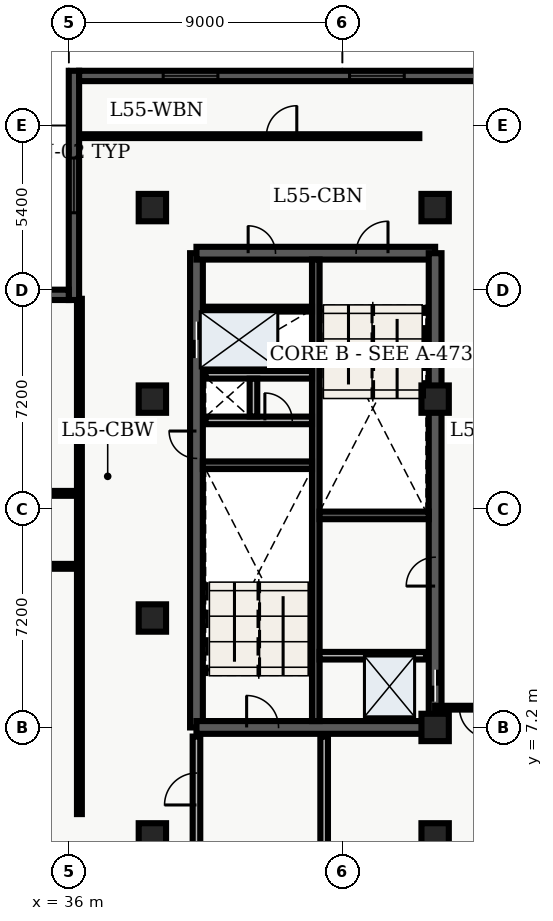
"""IFC4 building model, lengths in metres.
Left out: names, types, materials, properties, quantities, classifications, styles, units other than length and angle.
Written with IfcOpenShell. Run it as: python <this file> out.ifc"""

import sys

from ifc_helpers import new_model, entity, si_unit, converted_unit, direction, frame, origin_with_axes, origin_2d_with_axis, place, context, subcontext, project, spatial, polyline, rectangle, outline, extrude, element, fill, save


model = new_model("IFC4")
c1 = context("Model", 3, precision=1e-05, world=origin_with_axes(), true_north=direction((0.0, 1.0)))
c2 = subcontext(c1, "Body", "Model", "MODEL_VIEW")
j1 = project(units=[si_unit("LENGTHUNIT", "METRE"), converted_unit("PLANEANGLEUNIT", "DEGREE", entity("IfcPlaneAngleMeasure", 0.017), si_unit("PLANEANGLEUNIT", "RADIAN"), dimensions=[0, 0, 0, 0, 0, 0, 0])], contexts=[c1])
p1 = place(None, origin_with_axes())
s1 = spatial("IfcSite", under=j1, at=p1, CompositionType="ELEMENT")
p2 = place(p1, origin_with_axes())
s2 = spatial("IfcBuilding", under=s1, at=p2, CompositionType="ELEMENT")
p3 = place(p2, frame((0.0, 0.0, 224.7), z_axis=(0.0, 0.0, 1.0), x_axis=(1.0, 0.0, 0.0)))
s3 = spatial("IfcBuildingStorey", under=s2, at=p3, CompositionType="ELEMENT", Elevation=224.7)
p4 = place(p3, frame((40.2, 7.2, 0.0), z_axis=(0.0, 0.0, 1.0), x_axis=(0.0, 1.0, 0.0)))
e1 = element("IfcWall", 1, at=p4, inside=s3, PredefinedType="SHEAR", context=c2, shape_type="SweptSolid", body=[
    extrude(outline(polyline([(0.0, -0.21), (15.6, -0.21), (15.6, 0.21), (0.0, 0.21), (0.0, -0.21)])), origin_with_axes(), (0.0, 0.0, 1.0), 3.66),
])
p5 = place(p4, frame((12.75, 0.0, 0.0), z_axis=(0.0, 0.0, 1.0), x_axis=(1.0, 0.0, 0.0)))
e2 = element("IfcOpeningElement", 2, at=p5, cuts=e1, PredefinedType="OPENING", context=c2, shape_type="SweptSolid", body=[
    extrude(rectangle(XDim=1.2, YDim=0.44, at=origin_2d_with_axis()), origin_with_axes(), (0.0, 0.0, 1.0), 2.15),
])
p6 = place(p4, frame((9.3, 0.0, 0.0), z_axis=(0.0, 0.0, 1.0), x_axis=(1.0, 0.0, 0.0)))
e3 = element("IfcOpeningElement", 3, at=p6, cuts=e1, PredefinedType="OPENING", context=c2, shape_type="SweptSolid", body=[
    extrude(rectangle(XDim=0.9, YDim=0.44, at=origin_2d_with_axis()), origin_with_axes(), (0.0, 0.0, 1.0), 2.15),
])
p7 = place(p3, frame((40.2, 7.2, 0.0), z_axis=(0.0, 0.0, 1.0), x_axis=(1.0, 0.0, 0.0)))
e4 = element("IfcWall", 4, at=p7, inside=s3, PredefinedType="SHEAR", context=c2, shape_type="SweptSolid", body=[
    extrude(outline(polyline([(0.0, -0.21), (7.85, -0.21), (7.85, 0.21), (0.0, 0.21), (0.0, -0.21)])), origin_with_axes(), (0.0, 0.0, 1.0), 3.66),
])
p8 = place(p7, frame((2.175, 0.0, 0.0), z_axis=(0.0, 0.0, 1.0), x_axis=(1.0, 0.0, 0.0)))
e5 = element("IfcOpeningElement", 5, at=p8, cuts=e4, PredefinedType="OPENING", context=c2, shape_type="SweptSolid", body=[
    extrude(rectangle(XDim=1.05, YDim=0.44, at=origin_2d_with_axis()), origin_with_axes(), (0.0, 0.0, 1.0), 2.15),
])
p9 = place(p3, frame((40.2, 22.8, 0.0), z_axis=(0.0, 0.0, 1.0), x_axis=(1.0, 0.0, 0.0)))
e6 = element("IfcWall", 6, at=p9, inside=s3, PredefinedType="SHEAR", context=c2, shape_type="SweptSolid", body=[
    extrude(outline(polyline([(0.0, -0.21), (7.85, -0.21), (7.85, 0.21), (0.0, 0.21), (0.0, -0.21)])), origin_with_axes(), (0.0, 0.0, 1.0), 3.66),
])
p10 = place(p9, frame((5.775, 0.0, 0.0), z_axis=(0.0, 0.0, 1.0), x_axis=(1.0, 0.0, 0.0)))
e7 = element("IfcOpeningElement", 7, at=p10, cuts=e6, PredefinedType="OPENING", context=c2, shape_type="SweptSolid", body=[
    extrude(rectangle(XDim=1.05, YDim=0.44, at=origin_2d_with_axis()), origin_with_axes(), (0.0, 0.0, 1.0), 2.15),
])
p11 = place(p9, frame((2.15, 0.0, 0.0), z_axis=(0.0, 0.0, 1.0), x_axis=(1.0, 0.0, 0.0)))
e8 = element("IfcOpeningElement", 8, at=p11, cuts=e6, PredefinedType="OPENING", context=c2, shape_type="SweptSolid", body=[
    extrude(rectangle(XDim=0.9, YDim=0.44, at=origin_2d_with_axis()), origin_with_axes(), (0.0, 0.0, 1.0), 2.15),
])
p12 = place(p3, frame((48.05, 7.2, 0.0), z_axis=(0.0, 0.0, 1.0), x_axis=(0.0, 1.0, 0.0)))
e9 = element("IfcWall", 9, at=p12, inside=s3, PredefinedType="SHEAR", context=c2, shape_type="SweptSolid", body=[
    extrude(outline(polyline([(0.0, -0.21), (15.6, -0.21), (15.6, 0.21), (0.0, 0.21), (0.0, -0.21)])), origin_with_axes(), (0.0, 0.0, 1.0), 3.66),
])
p13 = place(p12, frame((1.375, 0.0, 0.0), z_axis=(0.0, 0.0, 1.0), x_axis=(1.0, 0.0, 0.0)))
e10 = element("IfcOpeningElement", 10, at=p13, cuts=e9, PredefinedType="OPENING", context=c2, shape_type="SweptSolid", body=[
    extrude(rectangle(XDim=1.05, YDim=0.44, at=origin_2d_with_axis()), origin_with_axes(), (0.0, 0.0, 1.0), 2.15),
])
p14 = place(p12, frame((5.125, 0.0, 0.0), z_axis=(0.0, 0.0, 1.0), x_axis=(1.0, 0.0, 0.0)))
e11 = element("IfcOpeningElement", 11, at=p14, cuts=e9, PredefinedType="OPENING", context=c2, shape_type="SweptSolid", body=[
    extrude(rectangle(XDim=0.95, YDim=0.44, at=origin_2d_with_axis()), origin_with_axes(), (0.0, 0.0, 1.0), 2.15),
])
p15 = place(p3, frame((44.125, 7.41, 0.0), z_axis=(0.0, 0.0, 1.0), x_axis=(0.0, 1.0, 0.0)))
e12 = element("IfcWall", 12, at=p15, inside=s3, PredefinedType="SHEAR", context=c2, shape_type="SweptSolid", body=[
    extrude(outline(polyline([(0.0, -0.125), (15.18, -0.125), (15.18, 0.125), (0.0, 0.125), (0.0, -0.125)])), origin_with_axes(), (0.0, 0.0, 1.0), 3.66),
])
for number, where, z_axis, x_axis in (
    (13, (40.41, 15.825, 0.0), (0.0, 0.0, 1.0), (1.0, 0.0, 0.0)),
    (14, (44.25, 14.175, 0.0), (0.0, 0.0, 1.0), (1.0, 0.0, 0.0)),
):
    element("IfcWall", number, at=place(p3, frame(where, z_axis=z_axis, x_axis=x_axis)), inside=s3, PredefinedType="SHEAR", context=c2, shape_type="SweptSolid", body=[
        extrude(outline(polyline([(0.0, -0.125), (3.59, -0.125), (3.59, 0.125), (0.0, 0.125), (0.0, -0.125)])), origin_with_axes(), (0.0, 0.0, 1.0), 3.66),
    ])
p16 = place(p3, frame((40.5, 17.3, 0.0), z_axis=(0.0, 0.0, 1.0), x_axis=(1.0, 0.0, 0.0)))
e15 = element("IfcWall", 15, at=p16, inside=s3, PredefinedType="SOLIDWALL", context=c2, shape_type="SweptSolid", body=[
    extrude(outline(polyline([(0.0, -0.125), (3.5, -0.125), (3.5, 0.125), (0.0, 0.125), (0.0, -0.125)])), origin_with_axes(), (0.0, 0.0, 1.0), 2.7),
])
p17 = place(p16, frame((2.4, 0.0, 0.0), z_axis=(0.0, 0.0, 1.0), x_axis=(1.0, 0.0, 0.0)))
e16 = element("IfcOpeningElement", 16, at=p17, cuts=e15, PredefinedType="OPENING", context=c2, shape_type="SweptSolid", body=[
    extrude(rectangle(XDim=0.9, YDim=0.27, at=origin_2d_with_axis()), origin_with_axes(), (0.0, 0.0, 1.0), 2.15),
])
p18 = place(p3, frame((40.5, 18.8, 0.0), z_axis=(0.0, 0.0, 1.0), x_axis=(1.0, 0.0, 0.0)))
e17 = element("IfcWall", 17, at=p18, inside=s3, PredefinedType="SOLIDWALL", context=c2, shape_type="SweptSolid", body=[
    extrude(outline(polyline([(0.0, -0.125), (3.5, -0.125), (3.5, 0.125), (0.0, 0.125), (0.0, -0.125)])), origin_with_axes(), (0.0, 0.0, 1.0), 2.7),
])
p19 = place(p3, frame((42.075, 17.43, 0.0), z_axis=(0.0, 0.0, 1.0), x_axis=(0.0, 1.0, 0.0)))
e18 = element("IfcWall", 18, at=p19, inside=s3, PredefinedType="SOLIDWALL", context=c2, shape_type="SweptSolid", body=[
    extrude(outline(polyline([(0.0, -0.125), (1.24, -0.125), (1.24, 0.125), (0.0, 0.125), (0.0, -0.125)])), origin_with_axes(), (0.0, 0.0, 1.0), 2.7),
])
p20 = place(p3, frame((40.2, 3.1, 0.0), z_axis=(0.0, 0.0, 1.0), x_axis=(0.0, 1.0, 0.0)))
e19 = element("IfcWall", 19, at=p20, inside=s3, PredefinedType="SOLIDWALL", context=c2, shape_type="SweptSolid", body=[
    extrude(outline(polyline([(0.0, -0.125), (3.8, -0.125), (3.8, 0.125), (0.0, 0.125), (0.0, -0.125)])), origin_with_axes(), (0.0, 0.0, 1.0), 2.7),
])
p21 = place(p20, frame((2.075, 0.0, 0.0), z_axis=(0.0, 0.0, 1.0), x_axis=(1.0, 0.0, 0.0)))
e20 = element("IfcOpeningElement", 20, at=p21, cuts=e19, PredefinedType="OPENING", context=c2, shape_type="SweptSolid", body=[
    extrude(rectangle(XDim=1.05, YDim=0.27, at=origin_2d_with_axis()), origin_with_axes(), (0.0, 0.0, 1.0), 2.15),
])
p22 = place(p3, frame((44.4, 3.1, 0.0), z_axis=(0.0, 0.0, 1.0), x_axis=(0.0, 1.0, 0.0)))
e21 = element("IfcWall", 21, at=p22, inside=s3, PredefinedType="SOLIDWALL", context=c2, shape_type="SweptSolid", body=[
    extrude(outline(polyline([(0.0, -0.125), (3.8, -0.125), (3.8, 0.125), (0.0, 0.125), (0.0, -0.125)])), origin_with_axes(), (0.0, 0.0, 1.0), 2.7),
])
for number, where, z_axis, x_axis in (
    (22, (38.75, 3.6, 0.0), (0.0, 0.0, 1.0), (1.0, 0.0, 0.0)),
    (23, (38.75, 10.8, 0.0), (0.0, 0.0, 1.0), (1.0, 0.0, 0.0)),
    (24, (38.75, 18.0, 0.0), (0.0, 0.0, 1.0), (1.0, 0.0, 0.0)),
    (25, (38.75, 24.3, 0.0), (0.0, 0.0, 1.0), (1.0, 0.0, 0.0)),
    (26, (48.05, 3.6, 0.0), (0.0, 0.0, 1.0), (1.0, 0.0, 0.0)),
    (27, (48.05, 7.2, 0.0), (0.0, 0.0, 1.0), (1.0, 0.0, 0.0)),
    (28, (48.05, 18.0, 0.0), (0.0, 0.0, 1.0), (1.0, 0.0, 0.0)),
    (29, (48.05, 24.3, 0.0), (0.0, 0.0, 1.0), (1.0, 0.0, 0.0)),
):
    element("IfcColumn", number, at=place(p3, frame(where, z_axis=z_axis, x_axis=x_axis)), inside=s3, PredefinedType="COLUMN", context=c2, shape_type="SweptSolid", body=[
        extrude(rectangle(XDim=0.9, YDim=0.9, at=origin_2d_with_axis()), origin_with_axes(), (0.0, 0.0, 1.0), 3.9),
    ])
p23 = place(p3, frame((40.5, 20.96, 0.0), z_axis=(0.0, 0.0, 1.0), x_axis=(1.0, 0.0, 0.0)))
e30 = element("IfcWall", 30, at=p23, inside=s3, PredefinedType="PARTITIONING", context=c2, shape_type="SweptSolid", body=[
    extrude(outline(polyline([(0.0, -0.08), (3.5, -0.08), (3.5, 0.08), (0.0, 0.08), (0.0, -0.08)])), origin_with_axes(), (0.0, 0.0, 1.0), 2.7),
])
p24 = place(p3, frame((44.25, 9.56, 0.0), z_axis=(0.0, 0.0, 1.0), x_axis=(1.0, 0.0, 0.0)))
e31 = element("IfcWall", 31, at=p24, inside=s3, PredefinedType="SOLIDWALL", context=c2, shape_type="SweptSolid", body=[
    extrude(outline(polyline([(0.0, -0.125), (3.5, -0.125), (3.5, 0.125), (0.0, 0.125), (0.0, -0.125)])), origin_with_axes(), (0.0, 0.0, 1.0), 2.7),
])
p25 = place(p3, frame((20.3, 12.5, 0.0), z_axis=(0.0, 0.0, 1.0), x_axis=(1.0, 0.0, 0.0)))
e32 = element("IfcWall", 32, at=p25, inside=s3, PredefinedType="PARTITIONING", context=c2, shape_type="SweptSolid", body=[
    extrude(outline(polyline([(0.0, -0.08), (16.05, -0.08), (16.05, 0.08), (0.0, 0.08), (0.0, -0.08)])), origin_with_axes(), (0.0, 0.0, 1.0), 2.7),
])
p26 = place(p25, frame((3.677, 0.0, 0.0), z_axis=(0.0, 0.0, 1.0), x_axis=(1.0, 0.0, 0.0)))
e33 = element("IfcOpeningElement", 33, at=p26, cuts=e32, PredefinedType="OPENING", context=c2, shape_type="SweptSolid", body=[
    extrude(rectangle(XDim=1.0, YDim=0.18, at=origin_2d_with_axis()), origin_with_axes(), (0.0, 0.0, 1.0), 2.15),
])
p27 = place(p25, frame((11.572, 0.0, 0.0), z_axis=(0.0, 0.0, 1.0), x_axis=(1.0, 0.0, 0.0)))
e34 = element("IfcOpeningElement", 34, at=p27, cuts=e32, PredefinedType="OPENING", context=c2, shape_type="SweptSolid", body=[
    extrude(rectangle(XDim=1.0, YDim=0.18, at=origin_2d_with_axis()), origin_with_axes(), (0.0, 0.0, 1.0), 2.15),
])
p28 = place(p3, frame((20.3, 14.9, 0.0), z_axis=(0.0, 0.0, 1.0), x_axis=(1.0, 0.0, 0.0)))
e35 = element("IfcWall", 35, at=p28, inside=s3, PredefinedType="PARTITIONING", context=c2, shape_type="SweptSolid", body=[
    extrude(outline(polyline([(0.0, -0.08), (16.05, -0.08), (16.05, 0.08), (0.0, 0.08), (0.0, -0.08)])), origin_with_axes(), (0.0, 0.0, 1.0), 2.7),
])
p29 = place(p28, frame((3.877, 0.0, 0.0), z_axis=(0.0, 0.0, 1.0), x_axis=(1.0, 0.0, 0.0)))
e36 = element("IfcOpeningElement", 36, at=p29, cuts=e35, PredefinedType="OPENING", context=c2, shape_type="SweptSolid", body=[
    extrude(rectangle(XDim=1.0, YDim=0.18, at=origin_2d_with_axis()), origin_with_axes(), (0.0, 0.0, 1.0), 2.15),
])
p30 = place(p28, frame((9.511, 0.0, 0.0), z_axis=(0.0, 0.0, 1.0), x_axis=(1.0, 0.0, 0.0)))
e37 = element("IfcOpeningElement", 37, at=p30, cuts=e35, PredefinedType="OPENING", context=c2, shape_type="SweptSolid", body=[
    extrude(rectangle(XDim=1.0, YDim=0.18, at=origin_2d_with_axis()), origin_with_axes(), (0.0, 0.0, 1.0), 2.15),
])
p31 = place(p28, frame((13.709, 0.0, 0.0), z_axis=(0.0, 0.0, 1.0), x_axis=(1.0, 0.0, 0.0)))
e38 = element("IfcOpeningElement", 38, at=p31, cuts=e35, PredefinedType="OPENING", context=c2, shape_type="SweptSolid", body=[
    extrude(rectangle(XDim=1.0, YDim=0.18, at=origin_2d_with_axis()), origin_with_axes(), (0.0, 0.0, 1.0), 2.15),
])
p32 = place(p3, frame((36.35, 4.35, 0.0), z_axis=(0.0, 0.0, 1.0), x_axis=(0.0, 1.0, 0.0)))
e39 = element("IfcWall", 39, at=p32, inside=s3, PredefinedType="PARTITIONING", context=c2, shape_type="SweptSolid", body=[
    extrude(outline(polyline([(0.0, -0.08), (16.95, -0.08), (16.95, 0.08), (0.0, 0.08), (0.0, -0.08)])), origin_with_axes(), (0.0, 0.0, 1.0), 2.7),
])
p33 = place(p3, frame((51.865, 7.85, 0.0), z_axis=(0.0, 0.0, 1.0), x_axis=(-1.0, 0.0, 0.0)))
e40 = element("IfcWall", 40, at=p33, inside=s3, PredefinedType="PARTITIONING", context=c2, shape_type="SweptSolid", body=[
    extrude(outline(polyline([(0.0, -0.062), (3.815, -0.062), (3.815, 0.062), (0.0, 0.062), (0.0, -0.062)])), origin_with_axes(), (0.0, 0.0, 1.0), 2.7),
])
p34 = place(p33, frame((2.515, 0.0, 0.0), z_axis=(0.0, 0.0, 1.0), x_axis=(1.0, 0.0, 0.0)))
e41 = element("IfcOpeningElement", 41, at=p34, cuts=e40, PredefinedType="OPENING", context=c2, shape_type="SweptSolid", body=[
    extrude(rectangle(XDim=1.0, YDim=0.145, at=origin_2d_with_axis()), origin_with_axes(), (0.0, 0.0, 1.0), 2.15),
])
p35 = place(p3, frame((36.335, 26.65, 0.0), z_axis=(0.0, 0.0, 1.0), x_axis=(1.0, 0.0, 0.0)))
e42 = element("IfcWall", 42, at=p35, inside=s3, PredefinedType="PARTITIONING", context=c2, shape_type="SweptSolid", body=[
    extrude(outline(polyline([(0.0, -0.062), (11.195, -0.062), (11.195, 0.062), (0.0, 0.062), (0.0, -0.062)])), origin_with_axes(), (0.0, 0.0, 1.0), 2.7),
])
p36 = place(p35, frame((6.665, 0.0, 0.0), z_axis=(0.0, 0.0, 1.0), x_axis=(1.0, 0.0, 0.0)))
e43 = element("IfcOpeningElement", 43, at=p36, cuts=e42, PredefinedType="OPENING", context=c2, shape_type="SweptSolid", body=[
    extrude(rectangle(XDim=1.0, YDim=0.145, at=origin_2d_with_axis()), origin_with_axes(), (0.0, 0.0, 1.0), 2.15),
])
p37 = place(p3, frame((36.17, 21.26, 0.0), z_axis=(0.0, 0.0, 1.0), x_axis=(0.0, 1.0, 0.0)))
e44 = element("IfcWall", 44, at=p37, inside=s3, PredefinedType="SOLIDWALL", context=c2, shape_type="SweptSolid", body=[
    extrude(outline(polyline([(0.0, -0.17), (7.54, -0.17), (7.54, 0.17), (0.0, 0.17), (0.0, -0.17)])), origin_with_axes(), (0.0, 0.0, 1.0), 3.66),
])
p38 = place(p37, frame((3.77, 0.0, 0.45), z_axis=(0.0, 0.0, 1.0), x_axis=(1.0, 0.0, 0.0)))
e45 = element("IfcOpeningElement", 45, at=p38, cuts=e44, PredefinedType="OPENING", context=c2, shape_type="SweptSolid", body=[
    extrude(rectangle(XDim=1.8, YDim=0.36, at=origin_2d_with_axis()), origin_with_axes(), (0.0, 0.0, 1.0), 2.1),
])
p39 = place(p3, frame((36.34, 28.63, 0.0), z_axis=(0.0, 0.0, 1.0), x_axis=(1.0, 0.0, 0.0)))
e46 = element("IfcWall", 46, at=p39, inside=s3, PredefinedType="SOLIDWALL", context=c2, shape_type="SweptSolid", body=[
    extrude(outline(polyline([(0.0, -0.17), (13.46, -0.17), (13.46, 0.17), (0.0, 0.17), (0.0, -0.17)])), origin_with_axes(), (0.0, 0.0, 1.0), 3.66),
])
p40 = place(p39, frame((3.665, 0.0, 0.45), z_axis=(0.0, 0.0, 1.0), x_axis=(1.0, 0.0, 0.0)))
e47 = element("IfcOpeningElement", 47, at=p40, cuts=e46, PredefinedType="OPENING", context=c2, shape_type="SweptSolid", body=[
    extrude(rectangle(XDim=1.8, YDim=0.36, at=origin_2d_with_axis()), origin_with_axes(), (0.0, 0.0, 1.0), 2.1),
])
p41 = place(p39, frame((9.795, 0.0, 0.45), z_axis=(0.0, 0.0, 1.0), x_axis=(1.0, 0.0, 0.0)))
e48 = element("IfcOpeningElement", 48, at=p41, cuts=e46, PredefinedType="OPENING", context=c2, shape_type="SweptSolid", body=[
    extrude(rectangle(XDim=1.8, YDim=0.36, at=origin_2d_with_axis()), origin_with_axes(), (0.0, 0.0, 1.0), 2.1),
])
p42 = place(p3, frame((32.06, 21.43, 0.0), z_axis=(0.0, 0.0, 1.0), x_axis=(1.0, 0.0, 0.0)))
e49 = element("IfcWall", 49, at=p42, inside=s3, PredefinedType="SOLIDWALL", context=c2, shape_type="SweptSolid", body=[
    extrude(outline(polyline([(0.0, -0.17), (3.94, -0.17), (3.94, 0.17), (0.0, 0.17), (0.0, -0.17)])), origin_with_axes(), (0.0, 0.0, 1.0), 3.66),
])
p43 = place(p12, frame((1.375, 0.0, 0.0), z_axis=(0.0, 0.0, 1.0), x_axis=(1.0, 0.0, 0.0)))
e50 = element("IfcDoor", 50, at=p43, inside=s3, OperationType="SLIDING_TO_LEFT", PredefinedType="DOOR", context=c2, shape_type="SweptSolid", body=[
    extrude(rectangle(XDim=1.05, YDim=0.09, at=origin_2d_with_axis()), origin_with_axes(), (0.0, 0.0, 1.0), 2.15),
])
fill(e10, e50)
p44 = place(p4, frame((12.75, 0.0, 0.0), z_axis=(0.0, 0.0, 1.0), x_axis=(1.0, 0.0, 0.0)))
e51 = element("IfcDoor", 51, at=p44, inside=s3, OperationType="DOUBLE_DOOR_SLIDING", PredefinedType="DOOR", context=c2, shape_type="SweptSolid", body=[
    extrude(rectangle(XDim=1.2, YDim=0.09, at=origin_2d_with_axis()), origin_with_axes(), (0.0, 0.0, 1.0), 2.15),
])
fill(e2, e51)
p45 = place(p4, frame((9.3, 0.0, 0.0), z_axis=(0.0, 0.0, 1.0), x_axis=(1.0, 0.0, 0.0)))
e52 = element("IfcDoor", 52, at=p45, inside=s3, OperationType="SINGLE_SWING_RIGHT", PredefinedType="DOOR", context=c2, shape_type="SweptSolid", body=[
    extrude(rectangle(XDim=0.9, YDim=0.09, at=origin_2d_with_axis()), origin_with_axes(), (0.0, 0.0, 1.0), 2.15),
])
fill(e3, e52)
p46 = place(p16, frame((2.4, 0.0, 0.0), z_axis=(0.0, 0.0, 1.0), x_axis=(1.0, 0.0, 0.0)))
e53 = element("IfcDoor", 53, at=p46, inside=s3, OperationType="SINGLE_SWING_LEFT", PredefinedType="DOOR", context=c2, shape_type="SweptSolid", body=[
    extrude(rectangle(XDim=0.9, YDim=0.09, at=origin_2d_with_axis()), origin_with_axes(), (0.0, 0.0, 1.0), 2.15),
])
fill(e16, e53)
p47 = place(p7, frame((2.175, 0.0, 0.0), z_axis=(0.0, 0.0, 1.0), x_axis=(1.0, 0.0, 0.0)))
e54 = element("IfcDoor", 54, at=p47, inside=s3, OperationType="SINGLE_SWING_LEFT", PredefinedType="DOOR", context=c2, shape_type="SweptSolid", body=[
    extrude(rectangle(XDim=1.05, YDim=0.09, at=origin_2d_with_axis()), origin_with_axes(), (0.0, 0.0, 1.0), 2.15),
])
fill(e5, e54)
p48 = place(p9, frame((5.775, 0.0, 0.0), z_axis=(0.0, 0.0, 1.0), x_axis=(1.0, 0.0, 0.0)))
e55 = element("IfcDoor", 55, at=p48, inside=s3, OperationType="SINGLE_SWING_RIGHT", PredefinedType="DOOR", context=c2, shape_type="SweptSolid", body=[
    extrude(rectangle(XDim=1.05, YDim=0.09, at=origin_2d_with_axis()), origin_with_axes(), (0.0, 0.0, 1.0), 2.15),
])
fill(e7, e55)
p49 = place(p20, frame((2.075, 0.0, 0.0), z_axis=(0.0, 0.0, 1.0), x_axis=(1.0, 0.0, 0.0)))
e56 = element("IfcDoor", 56, at=p49, inside=s3, OperationType="SINGLE_SWING_LEFT", PredefinedType="DOOR", context=c2, shape_type="SweptSolid", body=[
    extrude(rectangle(XDim=1.05, YDim=0.09, at=origin_2d_with_axis()), origin_with_axes(), (0.0, 0.0, 1.0), 2.15),
])
fill(e20, e56)
p50 = place(p9, frame((2.15, 0.0, 0.0), z_axis=(0.0, 0.0, 1.0), x_axis=(1.0, 0.0, 0.0)))
e57 = element("IfcDoor", 57, at=p50, inside=s3, OperationType="SINGLE_SWING_LEFT", PredefinedType="DOOR", context=c2, shape_type="SweptSolid", body=[
    extrude(rectangle(XDim=0.9, YDim=0.09, at=origin_2d_with_axis()), origin_with_axes(), (0.0, 0.0, 1.0), 2.15),
])
fill(e8, e57)
p51 = place(p12, frame((5.125, 0.0, 0.0), z_axis=(0.0, 0.0, 1.0), x_axis=(1.0, 0.0, 0.0)))
e58 = element("IfcDoor", 58, at=p51, inside=s3, OperationType="SINGLE_SWING_LEFT", PredefinedType="DOOR", context=c2, shape_type="SweptSolid", body=[
    extrude(rectangle(XDim=0.95, YDim=0.09, at=origin_2d_with_axis()), origin_with_axes(), (0.0, 0.0, 1.0), 2.15),
])
fill(e11, e58)
p52 = place(p33, frame((2.515, 0.0, 0.0), z_axis=(0.0, 0.0, 1.0), x_axis=(1.0, 0.0, 0.0)))
e59 = element("IfcDoor", 59, at=p52, inside=s3, OperationType="SINGLE_SWING_LEFT", PredefinedType="DOOR", context=c2, shape_type="SweptSolid", body=[
    extrude(rectangle(XDim=1.0, YDim=0.075, at=origin_2d_with_axis()), origin_with_axes(), (0.0, 0.0, 1.0), 2.15),
])
fill(e41, e59)
p53 = place(p35, frame((6.665, 0.0, 0.0), z_axis=(0.0, 0.0, 1.0), x_axis=(1.0, 0.0, 0.0)))
e60 = element("IfcDoor", 60, at=p53, inside=s3, OperationType="SINGLE_SWING_RIGHT", PredefinedType="DOOR", context=c2, shape_type="SweptSolid", body=[
    extrude(rectangle(XDim=1.0, YDim=0.075, at=origin_2d_with_axis()), origin_with_axes(), (0.0, 0.0, 1.0), 2.15),
])
fill(e43, e60)
p54 = place(p37, frame((3.77, 0.0, 0.45), z_axis=(0.0, 0.0, 1.0), x_axis=(1.0, 0.0, 0.0)))
e61 = element("IfcWindow", 61, at=p54, inside=s3, PredefinedType="WINDOW", context=c2, shape_type="SweptSolid", body=[
    extrude(rectangle(XDim=1.8, YDim=0.09, at=origin_2d_with_axis()), origin_with_axes(), (0.0, 0.0, 1.0), 2.1),
])
fill(e45, e61)
p55 = place(p39, frame((3.665, 0.0, 0.45), z_axis=(0.0, 0.0, 1.0), x_axis=(1.0, 0.0, 0.0)))
e62 = element("IfcWindow", 62, at=p55, inside=s3, PredefinedType="WINDOW", context=c2, shape_type="SweptSolid", body=[
    extrude(rectangle(XDim=1.8, YDim=0.09, at=origin_2d_with_axis()), origin_with_axes(), (0.0, 0.0, 1.0), 2.1),
])
fill(e47, e62)
p56 = place(p39, frame((9.795, 0.0, 0.45), z_axis=(0.0, 0.0, 1.0), x_axis=(1.0, 0.0, 0.0)))
e63 = element("IfcWindow", 63, at=p56, inside=s3, PredefinedType="WINDOW", context=c2, shape_type="SweptSolid", body=[
    extrude(rectangle(XDim=1.8, YDim=0.09, at=origin_2d_with_axis()), origin_with_axes(), (0.0, 0.0, 1.0), 2.1),
])
fill(e48, e63)
save(model, sys.argv[1])
